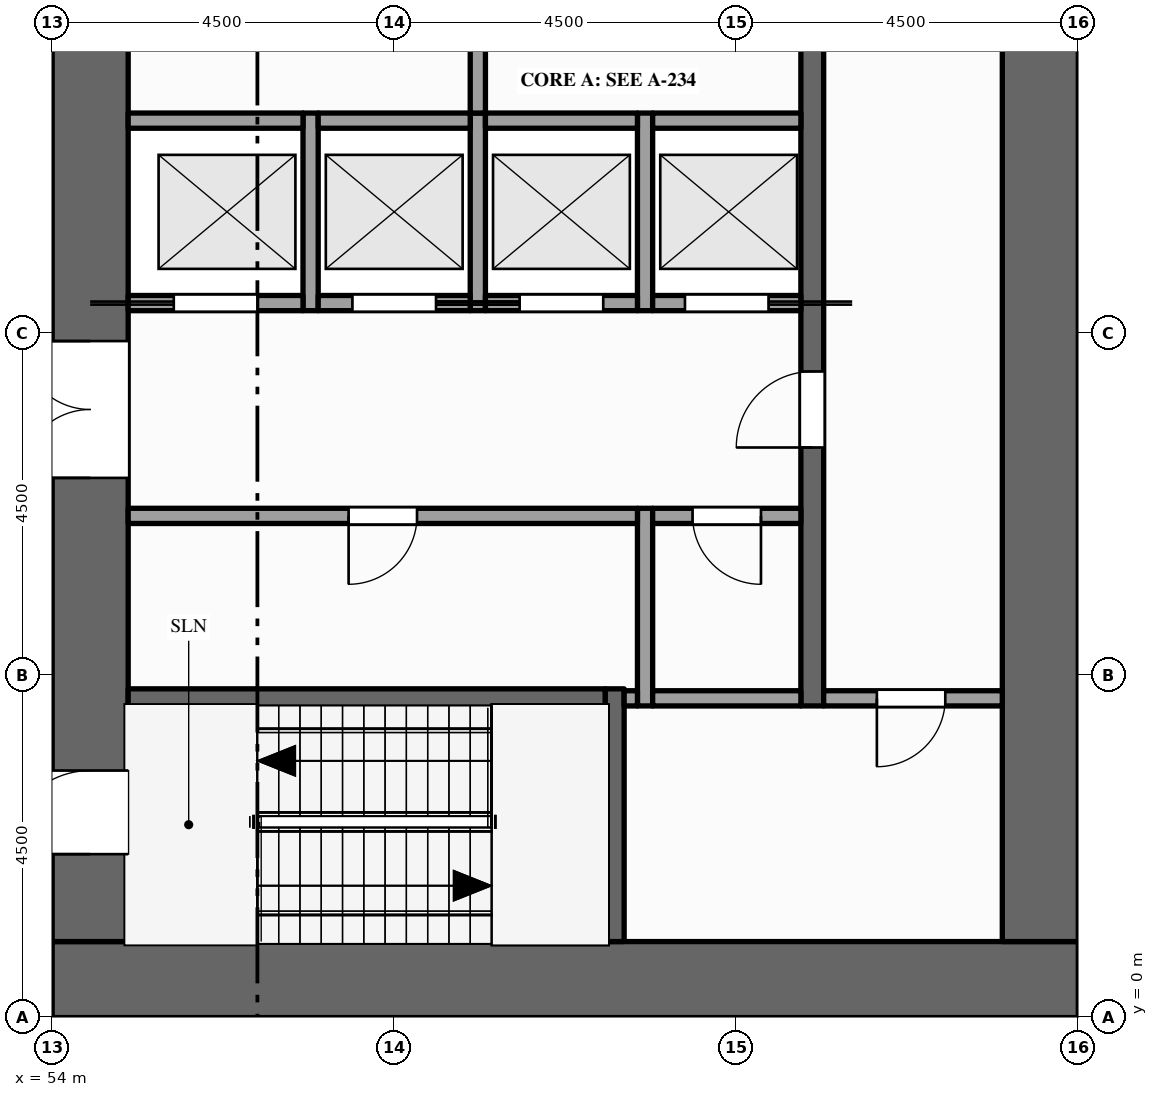
"""IFC4 building model, lengths in metres.
Left out: names, types, materials, properties, quantities, classifications, styles, units other than length and angle.
Written with IfcOpenShell. Run it as: python <this file> out.ifc"""

import sys

from ifc_helpers import new_model, si_unit, direction, frame, frame_2d, origin, place, context, subcontext, project, spatial, rectangle, extrude, element, fill, save


model = new_model("IFC4")
c1 = context("Model", 3, precision=1e-05, world=origin(), true_north=direction((0.0, 1.0)))
c2 = subcontext(c1, "Body", "Model", "MODEL_VIEW")
j1 = project(units=[si_unit("LENGTHUNIT", "METRE"), si_unit("PLANEANGLEUNIT", "RADIAN")], contexts=[c1])
p1 = place(None, origin())
s1 = spatial("IfcSite", under=j1, at=p1, CompositionType="ELEMENT")
p2 = place(p1, origin())
s2 = spatial("IfcBuilding", under=s1, at=p2, CompositionType="ELEMENT")
p3 = place(p2, frame((0.0, 0.0, 187.0)))
s3 = spatial("IfcBuildingStorey", under=s2, at=p3, CompositionType="ELEMENT", Elevation=187.0)
p4 = place(p3, frame((67.5, 0.5, -0.15), z_axis=(0.0, 0.0, 1.0), x_axis=(-1.0, 0.0, 0.0)))
e1 = element("IfcWall", 1, at=p4, inside=s3, PredefinedType="SHEAR", context=c2, shape_type="SweptSolid", body=[
    extrude(rectangle(XDim=13.5, YDim=1.0, at=frame_2d((6.75, 0.0))), origin(), (0.0, 0.0, 1.0), 8.0),
])
p5 = place(p3, frame((54.5, 1.0, -0.15), z_axis=(0.0, 0.0, 1.0), x_axis=(0.0, 1.0, 0.0)))
e2 = element("IfcWall", 2, at=p5, inside=s3, PredefinedType="SHEAR", context=c2, shape_type="SweptSolid", body=[
    extrude(rectangle(XDim=20.5, YDim=1.0, at=frame_2d((10.25, 0.0))), origin(), (0.0, 0.0, 1.0), 8.0),
])
p6 = place(p5, frame((6.1, 0.0, 0.15)))
e3 = element("IfcOpeningElement", 3, at=p6, cuts=e2, PredefinedType="OPENING", context=c2, shape_type="SweptSolid", body=[
    extrude(rectangle(XDim=1.8, YDim=2.1, at=frame_2d((0.9, 1.05))), frame((0.0, 0.51, 0.0), z_axis=(0.0, -1.0, 0.0), x_axis=(1.0, 0.0, 0.0)), (0.0, 0.0, 1.0), 1.02),
])
p7 = place(p5, frame((12.15, 0.0, 0.15)))
e4 = element("IfcOpeningElement", 4, at=p7, cuts=e2, PredefinedType="OPENING", context=c2, shape_type="SweptSolid", body=[
    extrude(rectangle(XDim=1.1, YDim=2.1, at=frame_2d((0.55, 1.05))), frame((0.0, 0.51, 0.0), z_axis=(0.0, -1.0, 0.0), x_axis=(1.0, 0.0, 0.0)), (0.0, 0.0, 1.0), 1.02),
])
p8 = place(p5, frame((1.15, 0.0, 0.15)))
e5 = element("IfcOpeningElement", 5, at=p8, cuts=e2, PredefinedType="OPENING", context=c2, shape_type="SweptSolid", body=[
    extrude(rectangle(XDim=1.1, YDim=2.1, at=frame_2d((0.55, 1.05))), frame((0.0, 0.51, 0.0), z_axis=(0.0, -1.0, 0.0), x_axis=(1.0, 0.0, 0.0)), (0.0, 0.0, 1.0), 1.02),
])
p9 = place(p5, frame((18.35, 0.0, 0.15)))
e6 = element("IfcOpeningElement", 6, at=p9, cuts=e2, PredefinedType="OPENING", context=c2, shape_type="SweptSolid", body=[
    extrude(rectangle(XDim=1.1, YDim=2.1, at=frame_2d((0.55, 1.05))), frame((0.0, 0.51, 0.0), z_axis=(0.0, -1.0, 0.0), x_axis=(1.0, 0.0, 0.0)), (0.0, 0.0, 1.0), 1.02),
])
p10 = place(p3, frame((67.0, 1.0, -0.15), z_axis=(0.0, 0.0, 1.0), x_axis=(0.0, 1.0, 0.0)))
e7 = element("IfcWall", 7, at=p10, inside=s3, PredefinedType="SHEAR", context=c2, shape_type="SweptSolid", body=[
    extrude(rectangle(XDim=20.5, YDim=1.0, at=frame_2d((10.25, 0.0))), origin(), (0.0, 0.0, 1.0), 8.0),
])
for number, where, z_axis, x_axis in (
    (8, (57.4, 9.3, 0.0), (0.0, 0.0, 1.0), (0.0, 1.0, 0.0)),
    (9, (59.6, 9.3, 0.0), (0.0, 0.0, 1.0), (0.0, 1.0, 0.0)),
):
    element("IfcWall", number, at=place(p3, frame(where, z_axis=z_axis, x_axis=x_axis)), inside=s3, PredefinedType="SOLIDWALL", context=c2, shape_type="SweptSolid", body=[
        extrude(rectangle(XDim=2.6, YDim=0.2, at=frame_2d((1.3, 0.0))), origin(), (0.0, 0.0, 1.0), 7.85),
    ])
p11 = place(p3, frame((59.6, 11.9, 0.0), z_axis=(0.0, 0.0, 1.0), x_axis=(0.0, 1.0, 0.0)))
e10 = element("IfcWall", 10, at=p11, inside=s3, PredefinedType="PARTITIONING", context=c2, shape_type="SweptSolid", body=[
    extrude(rectangle(XDim=3.6, YDim=0.2, at=frame_2d((1.8, 0.0))), origin(), (0.0, 0.0, 1.0), 7.85),
])
p12 = place(p11, frame((1.3, 0.0, 0.0)))
e11 = element("IfcOpeningElement", 11, at=p12, cuts=e10, PredefinedType="OPENING", context=c2, shape_type="SweptSolid", body=[
    extrude(rectangle(XDim=1.0, YDim=2.1, at=frame_2d((0.5, 1.05))), frame((0.0, 0.11, 0.0), z_axis=(0.0, -1.0, 0.0), x_axis=(1.0, 0.0, 0.0)), (0.0, 0.0, 1.0), 0.22),
])
p13 = place(p3, frame((61.4, 1.0, 0.0), z_axis=(0.0, 0.0, 1.0), x_axis=(0.0, 1.0, 0.0)))
e12 = element("IfcWall", 12, at=p13, inside=s3, PredefinedType="SHEAR", context=c2, shape_type="SweptSolid", body=[
    extrude(rectangle(XDim=3.325, YDim=0.25, at=frame_2d((1.663, 0.0))), origin(), (0.0, 0.0, 1.0), 7.85),
])
p14 = place(p3, frame((61.8, 4.1, 0.0), z_axis=(0.0, 0.0, 1.0), x_axis=(0.0, 1.0, 0.0)))
e13 = element("IfcWall", 13, at=p14, inside=s3, PredefinedType="PARTITIONING", context=c2, shape_type="SweptSolid", body=[
    extrude(rectangle(XDim=2.6, YDim=0.2, at=frame_2d((1.3, 0.0))), origin(), (0.0, 0.0, 1.0), 7.85),
])
p15 = place(p3, frame((61.8, 9.3, 0.0), z_axis=(0.0, 0.0, 1.0), x_axis=(0.0, 1.0, 0.0)))
e14 = element("IfcWall", 14, at=p15, inside=s3, PredefinedType="SOLIDWALL", context=c2, shape_type="SweptSolid", body=[
    extrude(rectangle(XDim=2.6, YDim=0.2, at=frame_2d((1.3, 0.0))), origin(), (0.0, 0.0, 1.0), 7.85),
])
p16 = place(p3, frame((64.0, 4.1, 0.0), z_axis=(0.0, 0.0, 1.0), x_axis=(0.0, 1.0, 0.0)))
e15 = element("IfcWall", 15, at=p16, inside=s3, PredefinedType="SHEAR", context=c2, shape_type="SweptSolid", body=[
    extrude(rectangle(XDim=14.5, YDim=0.3, at=frame_2d((7.25, 0.0))), origin(), (0.0, 0.0, 1.0), 7.85),
])
p17 = place(p16, frame((3.4, 0.0, 0.0)))
e16 = element("IfcOpeningElement", 16, at=p17, cuts=e15, PredefinedType="OPENING", context=c2, shape_type="SweptSolid", body=[
    extrude(rectangle(XDim=1.0, YDim=2.1, at=frame_2d((0.5, 1.05))), frame((0.0, 0.16, 0.0), z_axis=(0.0, -1.0, 0.0), x_axis=(1.0, 0.0, 0.0)), (0.0, 0.0, 1.0), 0.32),
])
p18 = place(p16, frame((9.1, 0.0, 0.0)))
e17 = element("IfcOpeningElement", 17, at=p18, cuts=e15, PredefinedType="OPENING", context=c2, shape_type="SweptSolid", body=[
    extrude(rectangle(XDim=1.0, YDim=2.1, at=frame_2d((0.5, 1.05))), frame((0.0, 0.16, 0.0), z_axis=(0.0, -1.0, 0.0), x_axis=(1.0, 0.0, 0.0)), (0.0, 0.0, 1.0), 0.32),
])
p19 = place(p3, frame((55.0, 4.2, 0.0), z_axis=(0.0, 0.0, 1.0), x_axis=(1.0, 0.0, 0.0)))
e18 = element("IfcWall", 18, at=p19, inside=s3, PredefinedType="SHEAR", context=c2, shape_type="SweptSolid", body=[
    extrude(rectangle(XDim=6.275, YDim=0.25, at=frame_2d((3.137, 0.0))), origin(), (0.0, 0.0, 1.0), 7.85),
])
p20 = place(p3, frame((61.525, 4.2, 0.0), z_axis=(0.0, 0.0, 1.0), x_axis=(1.0, 0.0, 0.0)))
e19 = element("IfcWall", 19, at=p20, inside=s3, PredefinedType="PARTITIONING", context=c2, shape_type="SweptSolid", body=[
    extrude(rectangle(XDim=0.175, YDim=0.2, at=frame_2d((0.087, 0.0))), origin(), (0.0, 0.0, 1.0), 7.85),
])
p21 = place(p3, frame((61.9, 4.2, 0.0), z_axis=(0.0, 0.0, 1.0), x_axis=(1.0, 0.0, 0.0)))
e20 = element("IfcWall", 20, at=p21, inside=s3, PredefinedType="PARTITIONING", context=c2, shape_type="SweptSolid", body=[
    extrude(rectangle(XDim=1.95, YDim=0.2, at=frame_2d((0.975, 0.0))), origin(), (0.0, 0.0, 1.0), 7.85),
])
p22 = place(p3, frame((64.15, 4.2, 0.0), z_axis=(0.0, 0.0, 1.0), x_axis=(1.0, 0.0, 0.0)))
e21 = element("IfcWall", 21, at=p22, inside=s3, PredefinedType="PARTITIONING", context=c2, shape_type="SweptSolid", body=[
    extrude(rectangle(XDim=2.35, YDim=0.2, at=frame_2d((1.175, 0.0))), origin(), (0.0, 0.0, 1.0), 7.85),
])
p23 = place(p22, frame((0.7, 0.0, 0.0)))
e22 = element("IfcOpeningElement", 22, at=p23, cuts=e21, PredefinedType="OPENING", context=c2, shape_type="SweptSolid", body=[
    extrude(rectangle(XDim=0.9, YDim=2.1, at=frame_2d((0.45, 1.05))), frame((0.0, 0.11, 0.0), z_axis=(0.0, -1.0, 0.0), x_axis=(1.0, 0.0, 0.0)), (0.0, 0.0, 1.0), 0.22),
])
p24 = place(p3, frame((55.0, 6.6, 0.0), z_axis=(0.0, 0.0, 1.0), x_axis=(1.0, 0.0, 0.0)))
e23 = element("IfcWall", 23, at=p24, inside=s3, PredefinedType="PARTITIONING", context=c2, shape_type="SweptSolid", body=[
    extrude(rectangle(XDim=6.7, YDim=0.2, at=frame_2d((3.35, 0.0))), origin(), (0.0, 0.0, 1.0), 7.85),
])
p25 = place(p24, frame((2.9, 0.0, 0.0)))
e24 = element("IfcOpeningElement", 24, at=p25, cuts=e23, PredefinedType="OPENING", context=c2, shape_type="SweptSolid", body=[
    extrude(rectangle(XDim=0.9, YDim=2.1, at=frame_2d((0.45, 1.05))), frame((0.0, 0.11, 0.0), z_axis=(0.0, -1.0, 0.0), x_axis=(1.0, 0.0, 0.0)), (0.0, 0.0, 1.0), 0.22),
])
p26 = place(p3, frame((61.9, 6.6, 0.0), z_axis=(0.0, 0.0, 1.0), x_axis=(1.0, 0.0, 0.0)))
e25 = element("IfcWall", 25, at=p26, inside=s3, PredefinedType="PARTITIONING", context=c2, shape_type="SweptSolid", body=[
    extrude(rectangle(XDim=1.95, YDim=0.2, at=frame_2d((0.975, 0.0))), origin(), (0.0, 0.0, 1.0), 7.85),
])
p27 = place(p26, frame((0.525, 0.0, 0.0)))
e26 = element("IfcOpeningElement", 26, at=p27, cuts=e25, PredefinedType="OPENING", context=c2, shape_type="SweptSolid", body=[
    extrude(rectangle(XDim=0.9, YDim=2.1, at=frame_2d((0.45, 1.05))), frame((0.0, 0.11, 0.0), z_axis=(0.0, -1.0, 0.0), x_axis=(1.0, 0.0, 0.0)), (0.0, 0.0, 1.0), 0.22),
])
p28 = place(p3, frame((55.0, 9.4, 0.0), z_axis=(0.0, 0.0, 1.0), x_axis=(1.0, 0.0, 0.0)))
e27 = element("IfcWall", 27, at=p28, inside=s3, PredefinedType="SOLIDWALL", context=c2, shape_type="SweptSolid", body=[
    extrude(rectangle(XDim=2.3, YDim=0.2, at=frame_2d((1.15, 0.0))), origin(), (0.0, 0.0, 1.0), 7.85),
])
p29 = place(p28, frame((0.6, 0.0, 0.012)))
e28 = element("IfcOpeningElement", 28, at=p29, cuts=e27, PredefinedType="OPENING", context=c2, shape_type="SweptSolid", body=[
    extrude(rectangle(XDim=1.1, YDim=2.1, at=frame_2d((0.55, 1.05))), frame((0.0, 0.11, 0.0), z_axis=(0.0, -1.0, 0.0), x_axis=(1.0, 0.0, 0.0)), (0.0, 0.0, 1.0), 0.22),
])
p30 = place(p3, frame((57.5, 9.4, 0.0), z_axis=(0.0, 0.0, 1.0), x_axis=(1.0, 0.0, 0.0)))
e29 = element("IfcWall", 29, at=p30, inside=s3, PredefinedType="SOLIDWALL", context=c2, shape_type="SweptSolid", body=[
    extrude(rectangle(XDim=2.0, YDim=0.2, at=frame_2d((1.0, 0.0))), origin(), (0.0, 0.0, 1.0), 7.85),
])
p31 = place(p30, frame((0.45, 0.0, 0.012)))
e30 = element("IfcOpeningElement", 30, at=p31, cuts=e29, PredefinedType="OPENING", context=c2, shape_type="SweptSolid", body=[
    extrude(rectangle(XDim=1.1, YDim=2.1, at=frame_2d((0.55, 1.05))), frame((0.0, 0.11, 0.0), z_axis=(0.0, -1.0, 0.0), x_axis=(1.0, 0.0, 0.0)), (0.0, 0.0, 1.0), 0.22),
])
p32 = place(p3, frame((59.7, 9.4, 0.0), z_axis=(0.0, 0.0, 1.0), x_axis=(1.0, 0.0, 0.0)))
e31 = element("IfcWall", 31, at=p32, inside=s3, PredefinedType="SOLIDWALL", context=c2, shape_type="SweptSolid", body=[
    extrude(rectangle(XDim=2.0, YDim=0.2, at=frame_2d((1.0, 0.0))), origin(), (0.0, 0.0, 1.0), 7.85),
])
p33 = place(p32, frame((0.45, 0.0, 0.012)))
e32 = element("IfcOpeningElement", 32, at=p33, cuts=e31, PredefinedType="OPENING", context=c2, shape_type="SweptSolid", body=[
    extrude(rectangle(XDim=1.1, YDim=2.1, at=frame_2d((0.55, 1.05))), frame((0.0, 0.11, 0.0), z_axis=(0.0, -1.0, 0.0), x_axis=(1.0, 0.0, 0.0)), (0.0, 0.0, 1.0), 0.22),
])
p34 = place(p3, frame((61.9, 9.4, 0.0), z_axis=(0.0, 0.0, 1.0), x_axis=(1.0, 0.0, 0.0)))
e33 = element("IfcWall", 33, at=p34, inside=s3, PredefinedType="SOLIDWALL", context=c2, shape_type="SweptSolid", body=[
    extrude(rectangle(XDim=1.95, YDim=0.2, at=frame_2d((0.975, 0.0))), origin(), (0.0, 0.0, 1.0), 7.85),
])
p35 = place(p34, frame((0.425, 0.0, 0.012)))
e34 = element("IfcOpeningElement", 34, at=p35, cuts=e33, PredefinedType="OPENING", context=c2, shape_type="SweptSolid", body=[
    extrude(rectangle(XDim=1.1, YDim=2.1, at=frame_2d((0.55, 1.05))), frame((0.0, 0.11, 0.0), z_axis=(0.0, -1.0, 0.0), x_axis=(1.0, 0.0, 0.0)), (0.0, 0.0, 1.0), 0.22),
])
p36 = place(p3, frame((55.0, 11.8, 0.0), z_axis=(0.0, 0.0, 1.0), x_axis=(1.0, 0.0, 0.0)))
e35 = element("IfcWall", 35, at=p36, inside=s3, PredefinedType="SOLIDWALL", context=c2, shape_type="SweptSolid", body=[
    extrude(rectangle(XDim=2.3, YDim=0.2, at=frame_2d((1.15, 0.0))), origin(), (0.0, 0.0, 1.0), 7.85),
])
for number, where, z_axis, x_axis in (
    (36, (57.5, 11.8, 0.0), (0.0, 0.0, 1.0), (1.0, 0.0, 0.0)),
    (37, (59.7, 11.8, 0.0), (0.0, 0.0, 1.0), (1.0, 0.0, 0.0)),
):
    element("IfcWall", number, at=place(p3, frame(where, z_axis=z_axis, x_axis=x_axis)), inside=s3, PredefinedType="SOLIDWALL", context=c2, shape_type="SweptSolid", body=[
        extrude(rectangle(XDim=2.0, YDim=0.2, at=frame_2d((1.0, 0.0))), origin(), (0.0, 0.0, 1.0), 7.85),
    ])
p37 = place(p3, frame((61.9, 11.8, 0.0), z_axis=(0.0, 0.0, 1.0), x_axis=(1.0, 0.0, 0.0)))
e38 = element("IfcWall", 38, at=p37, inside=s3, PredefinedType="SOLIDWALL", context=c2, shape_type="SweptSolid", body=[
    extrude(rectangle(XDim=1.95, YDim=0.2, at=frame_2d((0.975, 0.0))), origin(), (0.0, 0.0, 1.0), 7.85),
])
p38 = place(p29, origin())
e39 = element("IfcDoor", 39, at=p38, inside=s3, OperationType="SLIDING_TO_LEFT", PredefinedType="DOOR", context=c2, shape_type="SweptSolid", body=[
    extrude(rectangle(XDim=1.1, YDim=2.1, at=frame_2d((0.55, 1.05))), frame((0.0, 0.025, 0.0), z_axis=(0.0, -1.0, 0.0), x_axis=(1.0, 0.0, 0.0)), (0.0, 0.0, 1.0), 0.05),
])
fill(e28, e39)
p39 = place(p31, origin())
e40 = element("IfcDoor", 40, at=p39, inside=s3, OperationType="SLIDING_TO_RIGHT", PredefinedType="DOOR", context=c2, shape_type="SweptSolid", body=[
    extrude(rectangle(XDim=1.1, YDim=2.1, at=frame_2d((0.55, 1.05))), frame((0.0, 0.025, 0.0), z_axis=(0.0, -1.0, 0.0), x_axis=(1.0, 0.0, 0.0)), (0.0, 0.0, 1.0), 0.05),
])
fill(e30, e40)
p40 = place(p33, origin())
e41 = element("IfcDoor", 41, at=p40, inside=s3, OperationType="SLIDING_TO_LEFT", PredefinedType="DOOR", context=c2, shape_type="SweptSolid", body=[
    extrude(rectangle(XDim=1.1, YDim=2.1, at=frame_2d((0.55, 1.05))), frame((0.0, 0.025, 0.0), z_axis=(0.0, -1.0, 0.0), x_axis=(1.0, 0.0, 0.0)), (0.0, 0.0, 1.0), 0.05),
])
fill(e32, e41)
p41 = place(p35, origin())
e42 = element("IfcDoor", 42, at=p41, inside=s3, OperationType="SLIDING_TO_RIGHT", PredefinedType="DOOR", context=c2, shape_type="SweptSolid", body=[
    extrude(rectangle(XDim=1.1, YDim=2.1, at=frame_2d((0.55, 1.05))), frame((0.0, 0.025, 0.0), z_axis=(0.0, -1.0, 0.0), x_axis=(1.0, 0.0, 0.0)), (0.0, 0.0, 1.0), 0.05),
])
fill(e34, e42)
p42 = place(p6, origin())
e43 = element("IfcDoor", 43, at=p42, inside=s3, OperationType="DOUBLE_DOOR_SINGLE_SWING", PredefinedType="DOOR", context=c2, shape_type="SweptSolid", body=[
    extrude(rectangle(XDim=1.8, YDim=2.1, at=frame_2d((0.9, 1.05))), frame((0.0, 0.025, 0.0), z_axis=(0.0, -1.0, 0.0), x_axis=(1.0, 0.0, 0.0)), (0.0, 0.0, 1.0), 0.05),
])
fill(e3, e43)
p43 = place(p17, origin())
e44 = element("IfcDoor", 44, at=p43, inside=s3, OperationType="SINGLE_SWING_LEFT", PredefinedType="DOOR", context=c2, shape_type="SweptSolid", body=[
    extrude(rectangle(XDim=1.0, YDim=2.1, at=frame_2d((0.5, 1.05))), frame((0.0, 0.025, 0.0), z_axis=(0.0, -1.0, 0.0), x_axis=(1.0, 0.0, 0.0)), (0.0, 0.0, 1.0), 0.05),
])
fill(e16, e44)
p44 = place(p8, origin())
e45 = element("IfcDoor", 45, at=p44, inside=s3, OperationType="SINGLE_SWING_LEFT", PredefinedType="DOOR", context=c2, shape_type="SweptSolid", body=[
    extrude(rectangle(XDim=1.1, YDim=2.1, at=frame_2d((0.55, 1.05))), frame((0.0, 0.025, 0.0), z_axis=(0.0, -1.0, 0.0), x_axis=(1.0, 0.0, 0.0)), (0.0, 0.0, 1.0), 0.05),
])
fill(e5, e45)
p45 = place(p23, origin())
e46 = element("IfcDoor", 46, at=p45, inside=s3, OperationType="SINGLE_SWING_LEFT", PredefinedType="DOOR", context=c2, shape_type="SweptSolid", body=[
    extrude(rectangle(XDim=0.9, YDim=2.1, at=frame_2d((0.45, 1.05))), frame((0.0, 0.025, 0.0), z_axis=(0.0, -1.0, 0.0), x_axis=(1.0, 0.0, 0.0)), (0.0, 0.0, 1.0), 0.05),
])
fill(e22, e46)
p46 = place(p25, origin())
e47 = element("IfcDoor", 47, at=p46, inside=s3, OperationType="SINGLE_SWING_LEFT", PredefinedType="DOOR", context=c2, shape_type="SweptSolid", body=[
    extrude(rectangle(XDim=0.9, YDim=2.1, at=frame_2d((0.45, 1.05))), frame((0.0, 0.025, 0.0), z_axis=(0.0, -1.0, 0.0), x_axis=(1.0, 0.0, 0.0)), (0.0, 0.0, 1.0), 0.05),
])
fill(e24, e47)
p47 = place(p27, origin())
e48 = element("IfcDoor", 48, at=p47, inside=s3, OperationType="SINGLE_SWING_RIGHT", PredefinedType="DOOR", context=c2, shape_type="SweptSolid", body=[
    extrude(rectangle(XDim=0.9, YDim=2.1, at=frame_2d((0.45, 1.05))), frame((0.0, 0.025, 0.0), z_axis=(0.0, -1.0, 0.0), x_axis=(1.0, 0.0, 0.0)), (0.0, 0.0, 1.0), 0.05),
])
fill(e26, e48)
save(model, sys.argv[1])
